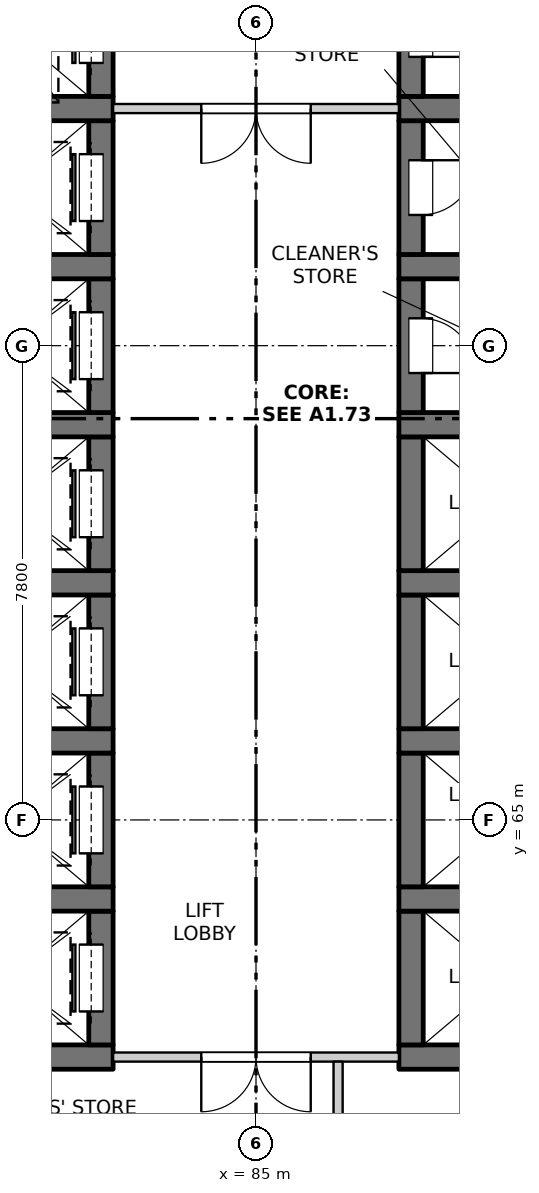
"""IFC4 building model, lengths in metres.
Left out: names, types, materials, properties, quantities, classifications, styles, units other than length and angle.
Written with IfcOpenShell. Run it as: python <this file> out.ifc"""

import sys

from ifc_helpers import new_model, si_unit, direction, frame, frame_2d, origin, place, context, subcontext, project, spatial, rectangle, extrude, element, fill, save


model = new_model("IFC4")
c1 = context("Model", 3, precision=1e-05, world=origin(), true_north=direction((0.0, 1.0)))
c2 = subcontext(c1, "Body", "Model", "MODEL_VIEW")
j1 = project(units=[si_unit("LENGTHUNIT", "METRE"), si_unit("PLANEANGLEUNIT", "RADIAN")], contexts=[c1])
p1 = place(None, origin())
s1 = spatial("IfcSite", under=j1, at=p1, CompositionType="ELEMENT")
p2 = place(p1, origin())
s2 = spatial("IfcBuilding", under=s1, at=p2, CompositionType="ELEMENT")
p3 = place(p2, frame((0.0, 0.0, 26.3)))
s3 = spatial("IfcBuildingStorey", under=s2, at=p3, CompositionType="ELEMENT", Elevation=26.3)
p4 = place(p3, frame((79.65, 61.1, -0.25), z_axis=(0.0, 0.0, 1.0), x_axis=(1.0, 0.0, 0.0)))
e1 = element("IfcWall", 1, at=p4, inside=s3, PredefinedType="SOLIDWALL", context=c2, shape_type="SweptSolid", body=[
    extrude(rectangle(XDim=3.0, YDim=0.4, at=frame_2d((1.5, 0.0))), origin(), (0.0, 0.0, 1.0), 3.4),
])
p5 = place(p3, frame((82.45, 61.3, -0.25), z_axis=(0.0, 0.0, 1.0), x_axis=(0.0, 1.0, 0.0)))
e2 = element("IfcWall", 2, at=p5, inside=s3, PredefinedType="SOLIDWALL", context=c2, shape_type="SweptSolid", body=[
    extrude(rectangle(XDim=2.2, YDim=0.4, at=frame_2d((1.1, 0.0))), origin(), (0.0, 0.0, 1.0), 3.4),
])
p6 = place(p5, frame((0.55, 0.0, 0.25)))
e3 = element("IfcOpeningElement", 3, at=p6, cuts=e2, PredefinedType="OPENING", context=c2, shape_type="SweptSolid", body=[
    extrude(rectangle(XDim=1.1, YDim=2.1, at=frame_2d((0.55, 1.05))), frame((0.0, 0.21, 0.0), z_axis=(0.0, -1.0, 0.0), x_axis=(1.0, 0.0, 0.0)), (0.0, 0.0, 1.0), 0.42),
])
p7 = place(p3, frame((79.65, 63.7, -0.25), z_axis=(0.0, 0.0, 1.0), x_axis=(1.0, 0.0, 0.0)))
e4 = element("IfcWall", 4, at=p7, inside=s3, PredefinedType="SOLIDWALL", context=c2, shape_type="SweptSolid", body=[
    extrude(rectangle(XDim=3.0, YDim=0.4, at=frame_2d((1.5, 0.0))), origin(), (0.0, 0.0, 1.0), 3.4),
])
p8 = place(p3, frame((82.45, 63.9, -0.25), z_axis=(0.0, 0.0, 1.0), x_axis=(0.0, 1.0, 0.0)))
e5 = element("IfcWall", 5, at=p8, inside=s3, PredefinedType="SOLIDWALL", context=c2, shape_type="SweptSolid", body=[
    extrude(rectangle(XDim=2.2, YDim=0.4, at=frame_2d((1.1, 0.0))), origin(), (0.0, 0.0, 1.0), 3.4),
])
p9 = place(p8, frame((0.55, 0.0, 0.25)))
e6 = element("IfcOpeningElement", 6, at=p9, cuts=e5, PredefinedType="OPENING", context=c2, shape_type="SweptSolid", body=[
    extrude(rectangle(XDim=1.1, YDim=2.1, at=frame_2d((0.55, 1.05))), frame((0.0, 0.21, 0.0), z_axis=(0.0, -1.0, 0.0), x_axis=(1.0, 0.0, 0.0)), (0.0, 0.0, 1.0), 0.42),
])
p10 = place(p3, frame((79.65, 66.3, -0.25), z_axis=(0.0, 0.0, 1.0), x_axis=(1.0, 0.0, 0.0)))
e7 = element("IfcWall", 7, at=p10, inside=s3, PredefinedType="SOLIDWALL", context=c2, shape_type="SweptSolid", body=[
    extrude(rectangle(XDim=3.0, YDim=0.4, at=frame_2d((1.5, 0.0))), origin(), (0.0, 0.0, 1.0), 3.4),
])
p11 = place(p3, frame((82.45, 66.5, -0.25), z_axis=(0.0, 0.0, 1.0), x_axis=(0.0, 1.0, 0.0)))
e8 = element("IfcWall", 8, at=p11, inside=s3, PredefinedType="SOLIDWALL", context=c2, shape_type="SweptSolid", body=[
    extrude(rectangle(XDim=2.2, YDim=0.4, at=frame_2d((1.1, 0.0))), origin(), (0.0, 0.0, 1.0), 3.4),
])
p12 = place(p11, frame((0.55, 0.0, 0.25)))
e9 = element("IfcOpeningElement", 9, at=p12, cuts=e8, PredefinedType="OPENING", context=c2, shape_type="SweptSolid", body=[
    extrude(rectangle(XDim=1.1, YDim=2.1, at=frame_2d((0.55, 1.05))), frame((0.0, 0.21, 0.0), z_axis=(0.0, -1.0, 0.0), x_axis=(1.0, 0.0, 0.0)), (0.0, 0.0, 1.0), 0.42),
])
p13 = place(p3, frame((79.65, 68.9, -0.25), z_axis=(0.0, 0.0, 1.0), x_axis=(1.0, 0.0, 0.0)))
e10 = element("IfcWall", 10, at=p13, inside=s3, PredefinedType="SOLIDWALL", context=c2, shape_type="SweptSolid", body=[
    extrude(rectangle(XDim=3.0, YDim=0.4, at=frame_2d((1.5, 0.0))), origin(), (0.0, 0.0, 1.0), 3.4),
])
p14 = place(p3, frame((82.45, 69.1, -0.25), z_axis=(0.0, 0.0, 1.0), x_axis=(0.0, 1.0, 0.0)))
e11 = element("IfcWall", 11, at=p14, inside=s3, PredefinedType="SOLIDWALL", context=c2, shape_type="SweptSolid", body=[
    extrude(rectangle(XDim=2.2, YDim=0.4, at=frame_2d((1.1, 0.0))), origin(), (0.0, 0.0, 1.0), 3.4),
])
p15 = place(p14, frame((0.55, 0.0, 0.25)))
e12 = element("IfcOpeningElement", 12, at=p15, cuts=e11, PredefinedType="OPENING", context=c2, shape_type="SweptSolid", body=[
    extrude(rectangle(XDim=1.1, YDim=2.1, at=frame_2d((0.55, 1.05))), frame((0.0, 0.21, 0.0), z_axis=(0.0, -1.0, 0.0), x_axis=(1.0, 0.0, 0.0)), (0.0, 0.0, 1.0), 0.42),
])
p16 = place(p3, frame((79.65, 71.5, -0.25), z_axis=(0.0, 0.0, 1.0), x_axis=(1.0, 0.0, 0.0)))
e13 = element("IfcWall", 13, at=p16, inside=s3, PredefinedType="SOLIDWALL", context=c2, shape_type="SweptSolid", body=[
    extrude(rectangle(XDim=3.0, YDim=0.4, at=frame_2d((1.5, 0.0))), origin(), (0.0, 0.0, 1.0), 3.4),
])
p17 = place(p3, frame((82.45, 71.7, -0.25), z_axis=(0.0, 0.0, 1.0), x_axis=(0.0, 1.0, 0.0)))
e14 = element("IfcWall", 14, at=p17, inside=s3, PredefinedType="SOLIDWALL", context=c2, shape_type="SweptSolid", body=[
    extrude(rectangle(XDim=2.2, YDim=0.4, at=frame_2d((1.1, 0.0))), origin(), (0.0, 0.0, 1.0), 3.4),
])
p18 = place(p17, frame((0.55, 0.0, 0.25)))
e15 = element("IfcOpeningElement", 15, at=p18, cuts=e14, PredefinedType="OPENING", context=c2, shape_type="SweptSolid", body=[
    extrude(rectangle(XDim=1.1, YDim=2.1, at=frame_2d((0.55, 1.05))), frame((0.0, 0.21, 0.0), z_axis=(0.0, -1.0, 0.0), x_axis=(1.0, 0.0, 0.0)), (0.0, 0.0, 1.0), 0.42),
])
p19 = place(p3, frame((79.65, 74.1, -0.25), z_axis=(0.0, 0.0, 1.0), x_axis=(1.0, 0.0, 0.0)))
e16 = element("IfcWall", 16, at=p19, inside=s3, PredefinedType="SOLIDWALL", context=c2, shape_type="SweptSolid", body=[
    extrude(rectangle(XDim=3.0, YDim=0.4, at=frame_2d((1.5, 0.0))), origin(), (0.0, 0.0, 1.0), 3.4),
])
p20 = place(p3, frame((82.45, 74.3, -0.25), z_axis=(0.0, 0.0, 1.0), x_axis=(0.0, 1.0, 0.0)))
e17 = element("IfcWall", 17, at=p20, inside=s3, PredefinedType="SOLIDWALL", context=c2, shape_type="SweptSolid", body=[
    extrude(rectangle(XDim=2.2, YDim=0.4, at=frame_2d((1.1, 0.0))), origin(), (0.0, 0.0, 1.0), 3.4),
])
p21 = place(p20, frame((0.55, 0.0, 0.25)))
e18 = element("IfcOpeningElement", 18, at=p21, cuts=e17, PredefinedType="OPENING", context=c2, shape_type="SweptSolid", body=[
    extrude(rectangle(XDim=1.1, YDim=2.1, at=frame_2d((0.55, 1.05))), frame((0.0, 0.21, 0.0), z_axis=(0.0, -1.0, 0.0), x_axis=(1.0, 0.0, 0.0)), (0.0, 0.0, 1.0), 0.42),
])
p22 = place(p3, frame((79.65, 76.7, -0.25), z_axis=(0.0, 0.0, 1.0), x_axis=(1.0, 0.0, 0.0)))
e19 = element("IfcWall", 19, at=p22, inside=s3, PredefinedType="SOLIDWALL", context=c2, shape_type="SweptSolid", body=[
    extrude(rectangle(XDim=3.0, YDim=0.4, at=frame_2d((1.5, 0.0))), origin(), (0.0, 0.0, 1.0), 3.4),
])
p23 = place(p3, frame((82.45, 76.9, -0.25), z_axis=(0.0, 0.0, 1.0), x_axis=(0.0, 1.0, 0.0)))
e20 = element("IfcWall", 20, at=p23, inside=s3, PredefinedType="SOLIDWALL", context=c2, shape_type="SweptSolid", body=[
    extrude(rectangle(XDim=2.2, YDim=0.4, at=frame_2d((1.1, 0.0))), origin(), (0.0, 0.0, 1.0), 3.4),
])
p24 = place(p23, frame((0.55, 0.0, 0.25)))
e21 = element("IfcOpeningElement", 21, at=p24, cuts=e20, PredefinedType="OPENING", context=c2, shape_type="SweptSolid", body=[
    extrude(rectangle(XDim=1.1, YDim=2.1, at=frame_2d((0.55, 1.05))), frame((0.0, 0.21, 0.0), z_axis=(0.0, -1.0, 0.0), x_axis=(1.0, 0.0, 0.0)), (0.0, 0.0, 1.0), 0.42),
])
p25 = place(p3, frame((87.35, 61.1, -0.25), z_axis=(0.0, 0.0, 1.0), x_axis=(1.0, 0.0, 0.0)))
e22 = element("IfcWall", 22, at=p25, inside=s3, PredefinedType="SOLIDWALL", context=c2, shape_type="SweptSolid", body=[
    extrude(rectangle(XDim=3.0, YDim=0.4, at=frame_2d((1.5, 0.0))), origin(), (0.0, 0.0, 1.0), 3.4),
])
p26 = place(p3, frame((87.55, 61.3, -0.25), z_axis=(0.0, 0.0, 1.0), x_axis=(0.0, 1.0, 0.0)))
e23 = element("IfcWall", 23, at=p26, inside=s3, PredefinedType="SOLIDWALL", context=c2, shape_type="SweptSolid", body=[
    extrude(rectangle(XDim=2.2, YDim=0.4, at=frame_2d((1.1, 0.0))), origin(), (0.0, 0.0, 1.0), 3.4),
])
p27 = place(p3, frame((87.35, 63.7, -0.25), z_axis=(0.0, 0.0, 1.0), x_axis=(1.0, 0.0, 0.0)))
e24 = element("IfcWall", 24, at=p27, inside=s3, PredefinedType="SOLIDWALL", context=c2, shape_type="SweptSolid", body=[
    extrude(rectangle(XDim=3.0, YDim=0.4, at=frame_2d((1.5, 0.0))), origin(), (0.0, 0.0, 1.0), 3.4),
])
p28 = place(p3, frame((87.55, 63.9, -0.25), z_axis=(0.0, 0.0, 1.0), x_axis=(0.0, 1.0, 0.0)))
e25 = element("IfcWall", 25, at=p28, inside=s3, PredefinedType="SOLIDWALL", context=c2, shape_type="SweptSolid", body=[
    extrude(rectangle(XDim=2.2, YDim=0.4, at=frame_2d((1.1, 0.0))), origin(), (0.0, 0.0, 1.0), 3.4),
])
p29 = place(p3, frame((87.35, 66.3, -0.25), z_axis=(0.0, 0.0, 1.0), x_axis=(1.0, 0.0, 0.0)))
e26 = element("IfcWall", 26, at=p29, inside=s3, PredefinedType="SOLIDWALL", context=c2, shape_type="SweptSolid", body=[
    extrude(rectangle(XDim=3.0, YDim=0.4, at=frame_2d((1.5, 0.0))), origin(), (0.0, 0.0, 1.0), 3.4),
])
p30 = place(p3, frame((87.55, 66.5, -0.25), z_axis=(0.0, 0.0, 1.0), x_axis=(0.0, 1.0, 0.0)))
e27 = element("IfcWall", 27, at=p30, inside=s3, PredefinedType="SOLIDWALL", context=c2, shape_type="SweptSolid", body=[
    extrude(rectangle(XDim=2.2, YDim=0.4, at=frame_2d((1.1, 0.0))), origin(), (0.0, 0.0, 1.0), 3.4),
])
p31 = place(p3, frame((87.35, 68.9, -0.25), z_axis=(0.0, 0.0, 1.0), x_axis=(1.0, 0.0, 0.0)))
e28 = element("IfcWall", 28, at=p31, inside=s3, PredefinedType="SOLIDWALL", context=c2, shape_type="SweptSolid", body=[
    extrude(rectangle(XDim=3.0, YDim=0.4, at=frame_2d((1.5, 0.0))), origin(), (0.0, 0.0, 1.0), 3.4),
])
p32 = place(p3, frame((87.55, 69.1, -0.25), z_axis=(0.0, 0.0, 1.0), x_axis=(0.0, 1.0, 0.0)))
e29 = element("IfcWall", 29, at=p32, inside=s3, PredefinedType="SOLIDWALL", context=c2, shape_type="SweptSolid", body=[
    extrude(rectangle(XDim=2.2, YDim=0.4, at=frame_2d((1.1, 0.0))), origin(), (0.0, 0.0, 1.0), 3.4),
])
p33 = place(p3, frame((87.35, 71.5, -0.25), z_axis=(0.0, 0.0, 1.0), x_axis=(1.0, 0.0, 0.0)))
e30 = element("IfcWall", 30, at=p33, inside=s3, PredefinedType="SOLIDWALL", context=c2, shape_type="SweptSolid", body=[
    extrude(rectangle(XDim=3.0, YDim=0.4, at=frame_2d((1.5, 0.0))), origin(), (0.0, 0.0, 1.0), 3.4),
])
p34 = place(p3, frame((87.55, 71.7, -0.25), z_axis=(0.0, 0.0, 1.0), x_axis=(0.0, 1.0, 0.0)))
e31 = element("IfcWall", 31, at=p34, inside=s3, PredefinedType="SOLIDWALL", context=c2, shape_type="SweptSolid", body=[
    extrude(rectangle(XDim=2.2, YDim=0.4, at=frame_2d((1.1, 0.0))), origin(), (0.0, 0.0, 1.0), 3.4),
])
p35 = place(p34, frame((0.65, 0.0, 0.25)))
e32 = element("IfcOpeningElement", 32, at=p35, cuts=e31, PredefinedType="OPENING", context=c2, shape_type="SweptSolid", body=[
    extrude(rectangle(XDim=0.9, YDim=2.1, at=frame_2d((0.45, 1.05))), frame((0.0, 0.21, 0.0), z_axis=(0.0, -1.0, 0.0), x_axis=(1.0, 0.0, 0.0)), (0.0, 0.0, 1.0), 0.42),
])
p36 = place(p3, frame((87.35, 74.1, -0.25), z_axis=(0.0, 0.0, 1.0), x_axis=(1.0, 0.0, 0.0)))
e33 = element("IfcWall", 33, at=p36, inside=s3, PredefinedType="SOLIDWALL", context=c2, shape_type="SweptSolid", body=[
    extrude(rectangle(XDim=3.0, YDim=0.4, at=frame_2d((1.5, 0.0))), origin(), (0.0, 0.0, 1.0), 3.4),
])
p37 = place(p3, frame((87.55, 74.3, -0.25), z_axis=(0.0, 0.0, 1.0), x_axis=(0.0, 1.0, 0.0)))
e34 = element("IfcWall", 34, at=p37, inside=s3, PredefinedType="SOLIDWALL", context=c2, shape_type="SweptSolid", body=[
    extrude(rectangle(XDim=2.2, YDim=0.4, at=frame_2d((1.1, 0.0))), origin(), (0.0, 0.0, 1.0), 3.4),
])
p38 = place(p37, frame((0.65, 0.0, 0.25)))
e35 = element("IfcOpeningElement", 35, at=p38, cuts=e34, PredefinedType="OPENING", context=c2, shape_type="SweptSolid", body=[
    extrude(rectangle(XDim=0.9, YDim=2.1, at=frame_2d((0.45, 1.05))), frame((0.0, 0.21, 0.0), z_axis=(0.0, -1.0, 0.0), x_axis=(1.0, 0.0, 0.0)), (0.0, 0.0, 1.0), 0.42),
])
p39 = place(p3, frame((87.35, 76.7, -0.25), z_axis=(0.0, 0.0, 1.0), x_axis=(1.0, 0.0, 0.0)))
e36 = element("IfcWall", 36, at=p39, inside=s3, PredefinedType="SOLIDWALL", context=c2, shape_type="SweptSolid", body=[
    extrude(rectangle(XDim=3.0, YDim=0.4, at=frame_2d((1.5, 0.0))), origin(), (0.0, 0.0, 1.0), 3.4),
])
p40 = place(p3, frame((87.55, 76.9, -0.25), z_axis=(0.0, 0.0, 1.0), x_axis=(0.0, 1.0, 0.0)))
e37 = element("IfcWall", 37, at=p40, inside=s3, PredefinedType="SOLIDWALL", context=c2, shape_type="SweptSolid", body=[
    extrude(rectangle(XDim=2.2, YDim=0.4, at=frame_2d((1.1, 0.0))), origin(), (0.0, 0.0, 1.0), 3.4),
])
p41 = place(p40, frame((0.65, 0.0, 0.25)))
e38 = element("IfcOpeningElement", 38, at=p41, cuts=e37, PredefinedType="OPENING", context=c2, shape_type="SweptSolid", body=[
    extrude(rectangle(XDim=0.9, YDim=2.1, at=frame_2d((0.45, 1.05))), frame((0.0, 0.21, 0.0), z_axis=(0.0, -1.0, 0.0), x_axis=(1.0, 0.0, 0.0)), (0.0, 0.0, 1.0), 0.42),
])
p42 = place(p3, frame((82.65, 61.1, 0.0), z_axis=(0.0, 0.0, 1.0), x_axis=(1.0, 0.0, 0.0)))
e39 = element("IfcWall", 39, at=p42, inside=s3, PredefinedType="PARTITIONING", context=c2, shape_type="SweptSolid", body=[
    extrude(rectangle(XDim=4.7, YDim=0.15, at=frame_2d((2.35, 0.0))), origin(), (0.0, 0.0, 1.0), 3.15),
])
p43 = place(p42, frame((1.45, 0.0, 0.0)))
e40 = element("IfcOpeningElement", 40, at=p43, cuts=e39, PredefinedType="OPENING", context=c2, shape_type="SweptSolid", body=[
    extrude(rectangle(XDim=1.8, YDim=2.1, at=frame_2d((0.9, 1.05))), frame((0.0, 0.085, 0.0), z_axis=(0.0, -1.0, 0.0), x_axis=(1.0, 0.0, 0.0)), (0.0, 0.0, 1.0), 0.17),
])
p44 = place(p3, frame((82.65, 76.7, 0.0), z_axis=(0.0, 0.0, 1.0), x_axis=(1.0, 0.0, 0.0)))
e41 = element("IfcWall", 41, at=p44, inside=s3, PredefinedType="PARTITIONING", context=c2, shape_type="SweptSolid", body=[
    extrude(rectangle(XDim=4.7, YDim=0.15, at=frame_2d((2.35, 0.0))), origin(), (0.0, 0.0, 1.0), 3.15),
])
p45 = place(p44, frame((1.45, 0.0, 0.0)))
e42 = element("IfcOpeningElement", 42, at=p45, cuts=e41, PredefinedType="OPENING", context=c2, shape_type="SweptSolid", body=[
    extrude(rectangle(XDim=1.8, YDim=2.1, at=frame_2d((0.9, 1.05))), frame((0.0, 0.085, 0.0), z_axis=(0.0, -1.0, 0.0), x_axis=(1.0, 0.0, 0.0)), (0.0, 0.0, 1.0), 0.17),
])
p46 = place(p3, frame((86.35, 55.6, 0.0), z_axis=(0.0, 0.0, 1.0), x_axis=(0.0, 1.0, 0.0)))
e43 = element("IfcWall", 43, at=p46, inside=s3, PredefinedType="PARTITIONING", context=c2, shape_type="SweptSolid", body=[
    extrude(rectangle(XDim=5.425, YDim=0.15, at=frame_2d((2.712, 0.0))), origin(), (0.0, 0.0, 1.0), 3.15),
])
p47 = place(p46, frame((2.1, 0.0, 0.0)))
e44 = element("IfcOpeningElement", 44, at=p47, cuts=e43, PredefinedType="OPENING", context=c2, shape_type="SweptSolid", body=[
    extrude(rectangle(XDim=0.9, YDim=2.1, at=frame_2d((0.45, 1.05))), frame((0.0, 0.085, 0.0), z_axis=(0.0, -1.0, 0.0), x_axis=(1.0, 0.0, 0.0)), (0.0, 0.0, 1.0), 0.17),
])
p48 = place(p43, origin())
e45 = element("IfcDoor", 45, at=p48, inside=s3, OperationType="DOUBLE_DOOR_SINGLE_SWING", PredefinedType="DOOR", context=c2, shape_type="SweptSolid", body=[
    extrude(rectangle(XDim=1.8, YDim=2.1, at=frame_2d((0.9, 1.05))), frame((0.0, 0.025, 0.0), z_axis=(0.0, -1.0, 0.0), x_axis=(1.0, 0.0, 0.0)), (0.0, 0.0, 1.0), 0.05),
])
fill(e40, e45)
p49 = place(p6, origin())
e46 = element("IfcDoor", 46, at=p49, inside=s3, OperationType="SLIDING_TO_RIGHT", PredefinedType="DOOR", context=c2, shape_type="SweptSolid", body=[
    extrude(rectangle(XDim=1.1, YDim=2.1, at=frame_2d((0.55, 1.05))), frame((0.0, 0.185, 0.0), z_axis=(0.0, -1.0, 0.0), x_axis=(1.0, 0.0, 0.0)), (0.0, 0.0, 1.0), 0.05),
])
fill(e3, e46)
p50 = place(p9, origin())
e47 = element("IfcDoor", 47, at=p50, inside=s3, OperationType="SLIDING_TO_RIGHT", PredefinedType="DOOR", context=c2, shape_type="SweptSolid", body=[
    extrude(rectangle(XDim=1.1, YDim=2.1, at=frame_2d((0.55, 1.05))), frame((0.0, 0.185, 0.0), z_axis=(0.0, -1.0, 0.0), x_axis=(1.0, 0.0, 0.0)), (0.0, 0.0, 1.0), 0.05),
])
fill(e6, e47)
p51 = place(p12, origin())
e48 = element("IfcDoor", 48, at=p51, inside=s3, OperationType="SLIDING_TO_RIGHT", PredefinedType="DOOR", context=c2, shape_type="SweptSolid", body=[
    extrude(rectangle(XDim=1.1, YDim=2.1, at=frame_2d((0.55, 1.05))), frame((0.0, 0.185, 0.0), z_axis=(0.0, -1.0, 0.0), x_axis=(1.0, 0.0, 0.0)), (0.0, 0.0, 1.0), 0.05),
])
fill(e9, e48)
p52 = place(p15, origin())
e49 = element("IfcDoor", 49, at=p52, inside=s3, OperationType="SLIDING_TO_LEFT", PredefinedType="DOOR", context=c2, shape_type="SweptSolid", body=[
    extrude(rectangle(XDim=1.1, YDim=2.1, at=frame_2d((0.55, 1.05))), frame((0.0, 0.185, 0.0), z_axis=(0.0, -1.0, 0.0), x_axis=(1.0, 0.0, 0.0)), (0.0, 0.0, 1.0), 0.05),
])
fill(e12, e49)
p53 = place(p18, origin())
e50 = element("IfcDoor", 50, at=p53, inside=s3, OperationType="SLIDING_TO_LEFT", PredefinedType="DOOR", context=c2, shape_type="SweptSolid", body=[
    extrude(rectangle(XDim=1.1, YDim=2.1, at=frame_2d((0.55, 1.05))), frame((0.0, 0.185, 0.0), z_axis=(0.0, -1.0, 0.0), x_axis=(1.0, 0.0, 0.0)), (0.0, 0.0, 1.0), 0.05),
])
fill(e15, e50)
p54 = place(p35, origin())
e51 = element("IfcDoor", 51, at=p54, inside=s3, OperationType="SINGLE_SWING_RIGHT", PredefinedType="DOOR", context=c2, shape_type="SweptSolid", body=[
    extrude(rectangle(XDim=0.9, YDim=2.1, at=frame_2d((0.45, 1.05))), frame((0.0, -0.135, 0.0), z_axis=(0.0, -1.0, 0.0), x_axis=(1.0, 0.0, 0.0)), (0.0, 0.0, 1.0), 0.05),
])
fill(e32, e51)
p55 = place(p21, origin())
e52 = element("IfcDoor", 52, at=p55, inside=s3, OperationType="SLIDING_TO_LEFT", PredefinedType="DOOR", context=c2, shape_type="SweptSolid", body=[
    extrude(rectangle(XDim=1.1, YDim=2.1, at=frame_2d((0.55, 1.05))), frame((0.0, 0.185, 0.0), z_axis=(0.0, -1.0, 0.0), x_axis=(1.0, 0.0, 0.0)), (0.0, 0.0, 1.0), 0.05),
])
fill(e18, e52)
p56 = place(p38, origin())
e53 = element("IfcDoor", 53, at=p56, inside=s3, OperationType="SINGLE_SWING_LEFT", PredefinedType="DOOR", context=c2, shape_type="SweptSolid", body=[
    extrude(rectangle(XDim=0.9, YDim=2.1, at=frame_2d((0.45, 1.05))), frame((0.0, -0.135, 0.0), z_axis=(0.0, -1.0, 0.0), x_axis=(1.0, 0.0, 0.0)), (0.0, 0.0, 1.0), 0.05),
])
fill(e35, e53)
p57 = place(p45, origin())
e54 = element("IfcDoor", 54, at=p57, inside=s3, OperationType="DOUBLE_DOOR_SINGLE_SWING", PredefinedType="DOOR", context=c2, shape_type="SweptSolid", body=[
    extrude(rectangle(XDim=1.8, YDim=2.1, at=frame_2d((0.9, 1.05))), frame((0.0, 0.025, 0.0), z_axis=(0.0, -1.0, 0.0), x_axis=(1.0, 0.0, 0.0)), (0.0, 0.0, 1.0), 0.05),
])
fill(e42, e54)
p58 = place(p24, origin())
e55 = element("IfcDoor", 55, at=p58, inside=s3, OperationType="SLIDING_TO_LEFT", PredefinedType="DOOR", context=c2, shape_type="SweptSolid", body=[
    extrude(rectangle(XDim=1.1, YDim=2.1, at=frame_2d((0.55, 1.05))), frame((0.0, 0.185, 0.0), z_axis=(0.0, -1.0, 0.0), x_axis=(1.0, 0.0, 0.0)), (0.0, 0.0, 1.0), 0.05),
])
fill(e21, e55)
p59 = place(p41, origin())
e56 = element("IfcDoor", 56, at=p59, inside=s3, OperationType="SINGLE_SWING_RIGHT", PredefinedType="DOOR", context=c2, shape_type="SweptSolid", body=[
    extrude(rectangle(XDim=0.9, YDim=2.1, at=frame_2d((0.45, 1.05))), frame((0.0, -0.135, 0.0), z_axis=(0.0, -1.0, 0.0), x_axis=(1.0, 0.0, 0.0)), (0.0, 0.0, 1.0), 0.05),
])
fill(e38, e56)
save(model, sys.argv[1])
